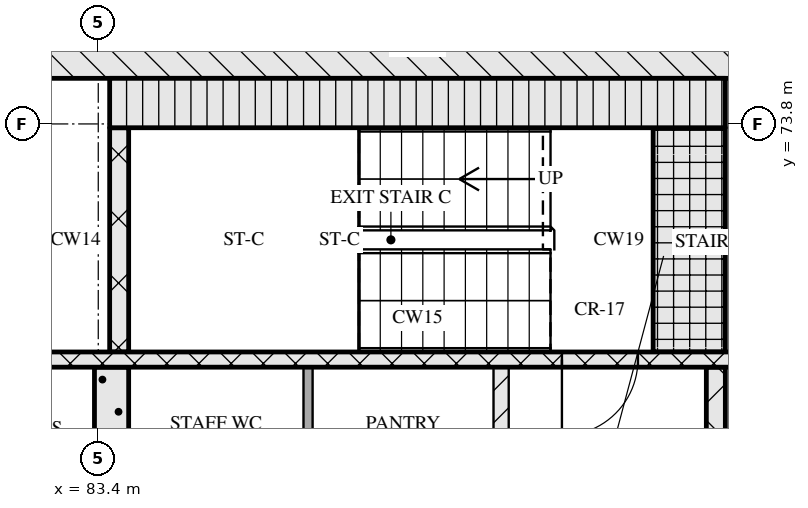
"""IFC4 building model, lengths in metres.
Left out: names, types, materials, properties, quantities, classifications, styles, units other than length and angle.
Written with IfcOpenShell. Run it as: python <this file> out.ifc"""

import sys

from ifc_helpers import new_model, si_unit, direction, frame, frame_2d, origin, place, context, subcontext, project, spatial, rectangle, extrude, element, fill, save


model = new_model("IFC4")
c1 = context("Model", 3, precision=1e-05, world=origin(), true_north=direction((0.0, 1.0)))
c2 = subcontext(c1, "Body", "Model", "MODEL_VIEW")
j1 = project(units=[si_unit("LENGTHUNIT", "METRE"), si_unit("PLANEANGLEUNIT", "RADIAN")], contexts=[c1])
p1 = place(None, origin())
s1 = spatial("IfcSite", under=j1, at=p1, CompositionType="ELEMENT")
p2 = place(p1, origin())
s2 = spatial("IfcBuilding", under=s1, at=p2, CompositionType="ELEMENT")
p3 = place(p2, frame((0.0, 0.0, 179.85)))
s3 = spatial("IfcBuildingStorey", under=s2, at=p3, CompositionType="ELEMENT", Elevation=179.85)
p4 = place(p3, frame((67.0, 74.8, 0.0), z_axis=(0.0, 0.0, 1.0), x_axis=(1.0, 0.0, 0.0)))
e1 = element("IfcWall", 1, at=p4, inside=s3, PredefinedType="SOLIDWALL", context=c2, shape_type="SweptSolid", body=[
    extrude(rectangle(XDim=41.2, YDim=0.8, at=frame_2d((20.6, 0.0))), origin(), (0.0, 0.0, 1.0), 3.32),
])
p5 = place(p3, frame((83.575, 68.0, 0.0), z_axis=(0.0, 0.0, 1.0), x_axis=(0.0, 1.0, 0.0)))
e2 = element("IfcWall", 2, at=p5, inside=s3, PredefinedType="SOLIDWALL", context=c2, shape_type="SweptSolid", body=[
    extrude(rectangle(XDim=2.6, YDim=0.45, at=frame_2d((1.3, 0.0))), origin(), (0.0, 0.0, 1.0), 3.32),
])
p6 = place(p3, frame((86.16, 68.0, 0.0), z_axis=(0.0, 0.0, 1.0), x_axis=(0.0, 1.0, 0.0)))
e3 = element("IfcWall", 3, at=p6, inside=s3, PredefinedType="PARTITIONING", context=c2, shape_type="SweptSolid", body=[
    extrude(rectangle(XDim=2.6, YDim=0.12, at=frame_2d((1.3, 0.0))), origin(), (0.0, 0.0, 1.0), 3.32),
])
p7 = place(p3, frame((88.7, 68.0, 0.0), z_axis=(0.0, 0.0, 1.0), x_axis=(0.0, 1.0, 0.0)))
e4 = element("IfcWall", 4, at=p7, inside=s3, PredefinedType="PARTITIONING", context=c2, shape_type="SweptSolid", body=[
    extrude(rectangle(XDim=2.6, YDim=0.2, at=frame_2d((1.3, 0.0))), origin(), (0.0, 0.0, 1.0), 3.32),
])
p8 = place(p3, frame((91.525, 68.0, 0.0), z_axis=(0.0, 0.0, 1.0), x_axis=(0.0, 1.0, 0.0)))
e5 = element("IfcWall", 5, at=p8, inside=s3, PredefinedType="SOLIDWALL", context=c2, shape_type="SweptSolid", body=[
    extrude(rectangle(XDim=2.6, YDim=0.25, at=frame_2d((1.3, 0.0))), origin(), (0.0, 0.0, 1.0), 3.32),
])
p9 = place(p3, frame((67.8, 70.7, 0.0), z_axis=(0.0, 0.0, 1.0), x_axis=(1.0, 0.0, 0.0)))
e6 = element("IfcWall", 6, at=p9, inside=s3, PredefinedType="SOLIDWALL", context=c2, shape_type="SweptSolid", body=[
    extrude(rectangle(XDim=39.6, YDim=0.2, at=frame_2d((19.8, 0.0))), origin(), (0.0, 0.0, 1.0), 3.32),
])
p10 = place(p9, frame((0.65, 0.0, 0.0)))
e7 = element("IfcOpeningElement", 7, at=p10, cuts=e6, PredefinedType="OPENING", context=c2, shape_type="SweptSolid", body=[
    extrude(rectangle(XDim=1.1, YDim=2.1, at=frame_2d((0.55, 1.05))), frame((0.0, 0.11, 0.0), z_axis=(0.0, -1.0, 0.0), x_axis=(1.0, 0.0, 0.0)), (0.0, 0.0, 1.0), 0.22),
])
p11 = place(p9, frame((3.25, 0.0, 0.0)))
e8 = element("IfcOpeningElement", 8, at=p11, cuts=e6, PredefinedType="OPENING", context=c2, shape_type="SweptSolid", body=[
    extrude(rectangle(XDim=1.1, YDim=2.1, at=frame_2d((0.55, 1.05))), frame((0.0, 0.11, 0.0), z_axis=(0.0, -1.0, 0.0), x_axis=(1.0, 0.0, 0.0)), (0.0, 0.0, 1.0), 0.22),
])
p12 = place(p9, frame((5.9, 0.0, 0.0)))
e9 = element("IfcOpeningElement", 9, at=p12, cuts=e6, PredefinedType="OPENING", context=c2, shape_type="SweptSolid", body=[
    extrude(rectangle(XDim=1.0, YDim=2.1, at=frame_2d((0.5, 1.05))), frame((0.0, 0.11, 0.0), z_axis=(0.0, -1.0, 0.0), x_axis=(1.0, 0.0, 0.0)), (0.0, 0.0, 1.0), 0.22),
])
p13 = place(p9, frame((21.7, 0.0, 0.0)))
e10 = element("IfcOpeningElement", 10, at=p13, cuts=e6, PredefinedType="OPENING", context=c2, shape_type="SweptSolid", body=[
    extrude(rectangle(XDim=1.0, YDim=2.1, at=frame_2d((0.5, 1.05))), frame((0.0, 0.11, 0.0), z_axis=(0.0, -1.0, 0.0), x_axis=(1.0, 0.0, 0.0)), (0.0, 0.0, 1.0), 0.22),
])
p14 = place(p9, frame((32.7, 0.0, 0.0)))
e11 = element("IfcOpeningElement", 11, at=p14, cuts=e6, PredefinedType="OPENING", context=c2, shape_type="SweptSolid", body=[
    extrude(rectangle(XDim=1.0, YDim=2.1, at=frame_2d((0.5, 1.05))), frame((0.0, 0.11, 0.0), z_axis=(0.0, -1.0, 0.0), x_axis=(1.0, 0.0, 0.0)), (0.0, 0.0, 1.0), 0.22),
])
p15 = place(p9, frame((35.25, 0.0, 0.0)))
e12 = element("IfcOpeningElement", 12, at=p15, cuts=e6, PredefinedType="OPENING", context=c2, shape_type="SweptSolid", body=[
    extrude(rectangle(XDim=1.1, YDim=2.1, at=frame_2d((0.55, 1.05))), frame((0.0, 0.11, 0.0), z_axis=(0.0, -1.0, 0.0), x_axis=(1.0, 0.0, 0.0)), (0.0, 0.0, 1.0), 0.22),
])
p16 = place(p9, frame((37.85, 0.0, 0.0)))
e13 = element("IfcOpeningElement", 13, at=p16, cuts=e6, PredefinedType="OPENING", context=c2, shape_type="SweptSolid", body=[
    extrude(rectangle(XDim=1.1, YDim=2.1, at=frame_2d((0.55, 1.05))), frame((0.0, 0.11, 0.0), z_axis=(0.0, -1.0, 0.0), x_axis=(1.0, 0.0, 0.0)), (0.0, 0.0, 1.0), 0.22),
])
p17 = place(p3, frame((83.675, 70.8, 0.0), z_axis=(0.0, 0.0, 1.0), x_axis=(0.0, 1.0, 0.0)))
e14 = element("IfcWall", 14, at=p17, inside=s3, PredefinedType="SOLIDWALL", context=c2, shape_type="SweptSolid", body=[
    extrude(rectangle(XDim=2.95, YDim=0.25, at=frame_2d((1.475, 0.0))), origin(), (0.0, 0.0, 1.0), 3.32),
])
p18 = place(p3, frame((91.175, 70.8, 0.0), z_axis=(0.0, 0.0, 1.0), x_axis=(0.0, 1.0, 0.0)))
e15 = element("IfcWall", 15, at=p18, inside=s3, PredefinedType="SOLIDWALL", context=c2, shape_type="SweptSolid", body=[
    extrude(rectangle(XDim=2.95, YDim=0.95, at=frame_2d((1.475, 0.0))), origin(), (0.0, 0.0, 1.0), 3.32),
])
p19 = place(p3, frame((83.55, 74.075, 0.0), z_axis=(0.0, 0.0, 1.0), x_axis=(1.0, 0.0, 0.0)))
e16 = element("IfcWall", 16, at=p19, inside=s3, PredefinedType="SOLIDWALL", context=c2, shape_type="SweptSolid", body=[
    extrude(rectangle(XDim=8.1, YDim=0.65, at=frame_2d((4.05, 0.0))), origin(), (0.0, 0.0, 1.0), 3.32),
])
p20 = place(p13, origin())
e17 = element("IfcDoor", 17, at=p20, inside=s3, OperationType="SINGLE_SWING_RIGHT", PredefinedType="DOOR", context=c2, shape_type="SweptSolid", body=[
    extrude(rectangle(XDim=1.0, YDim=2.1, at=frame_2d((0.5, 1.05))), frame((0.0, 0.025, 0.0), z_axis=(0.0, -1.0, 0.0), x_axis=(1.0, 0.0, 0.0)), (0.0, 0.0, 1.0), 0.05),
])
fill(e10, e17)
save(model, sys.argv[1])
